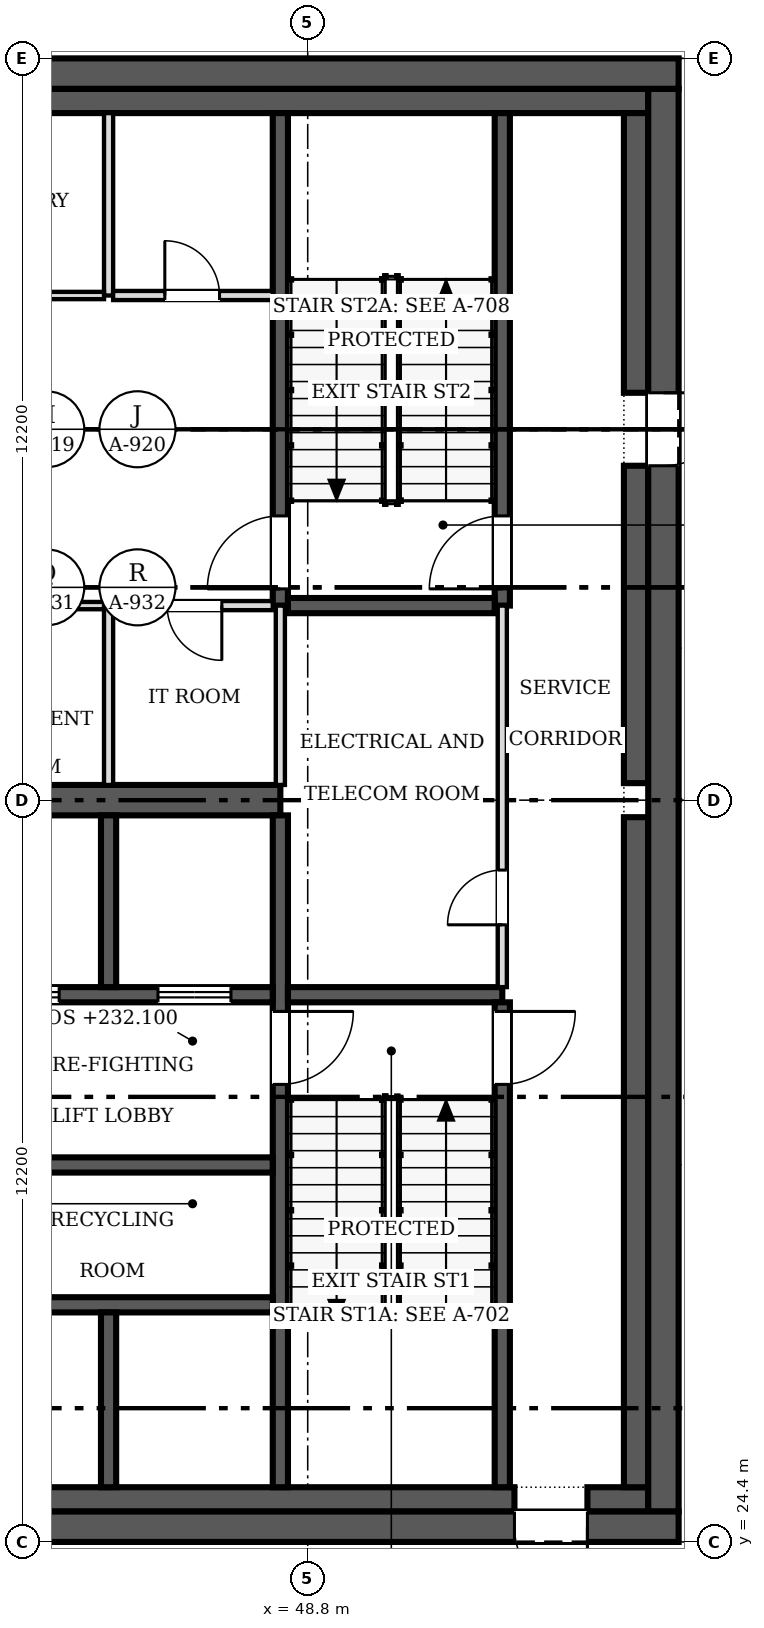
"""IFC4 building model, lengths in metres.
Left out: names, types, materials, properties, quantities, classifications, styles, units other than length and angle.
Written with IfcOpenShell. Run it as: python <this file> out.ifc"""

import sys

from ifc_helpers import new_model, si_unit, direction, frame, frame_2d, origin, place, context, subcontext, project, spatial, rectangle, extrude, source, transform, mapped, element, fill, save


model = new_model("IFC4")
c1 = context("Model", 3, precision=1e-05, world=origin(), true_north=direction((0.0, 1.0)))
c2 = subcontext(c1, "Body", "Model", "MODEL_VIEW")
j1 = project(units=[si_unit("LENGTHUNIT", "METRE"), si_unit("PLANEANGLEUNIT", "RADIAN")], contexts=[c1])
p1 = place(None, origin())
s1 = spatial("IfcSite", under=j1, at=p1, CompositionType="ELEMENT")
p2 = place(p1, origin())
s2 = spatial("IfcBuilding", under=s1, at=p2, CompositionType="ELEMENT")
p3 = place(p2, frame((0.0, 0.0, 232.1)))
s3 = spatial("IfcBuildingStorey", under=s2, at=p3, CompositionType="ELEMENT", Elevation=232.1)
p4 = place(p3, frame((54.9, 24.65, 0.0), z_axis=(0.0, 0.0, 1.0), x_axis=(-1.0, 0.0, 0.0)))
e1 = element("IfcWall", 1, at=p4, inside=s3, PredefinedType="SHEAR", context=c2, shape_type="SweptSolid", body=[
    extrude(rectangle(XDim=24.4, YDim=0.5, at=frame_2d((12.2, 0.0))), origin(), (0.0, 0.0, 1.0), 4.8),
])
m1 = source(origin(), c2, "Body", "SweptSolid", [
    extrude(rectangle(XDim=1.2, YDim=2.1, at=frame_2d((0.6, 1.05))), frame((0.0, 0.26, 0.0), z_axis=(0.0, -1.0, 0.0), x_axis=(1.0, 0.0, 0.0)), (0.0, 0.0, 1.0), 0.52),
])
p5 = place(p4, frame((1.5, 0.0, 0.0)))
e2 = element("IfcOpeningElement", 2, at=p5, cuts=e1, PredefinedType="OPENING", context=c2, shape_type="MappedRepresentation", body=[
    mapped(m1, transform((0.0, 0.0, 0.0), scale=1.0)),
])
p6 = place(p3, frame((30.5, 48.55, 0.0), z_axis=(0.0, 0.0, 1.0), x_axis=(1.0, 0.0, 0.0)))
e3 = element("IfcWall", 3, at=p6, inside=s3, PredefinedType="SHEAR", context=c2, shape_type="SweptSolid", body=[
    extrude(rectangle(XDim=24.4, YDim=0.5, at=frame_2d((12.2, 0.0))), origin(), (0.0, 0.0, 1.0), 4.8),
])
p7 = place(p3, frame((54.65, 48.3, 0.0), z_axis=(0.0, 0.0, 1.0), x_axis=(0.0, -1.0, 0.0)))
e4 = element("IfcWall", 4, at=p7, inside=s3, PredefinedType="SHEAR", context=c2, shape_type="SweptSolid", body=[
    extrude(rectangle(XDim=23.4, YDim=0.5, at=frame_2d((11.7, 0.0))), origin(), (0.0, 0.0, 1.0), 4.8),
])
p8 = place(p7, frame((5.0, 0.0, 0.0)))
e5 = element("IfcOpeningElement", 5, at=p8, cuts=e4, PredefinedType="OPENING", context=c2, shape_type="MappedRepresentation", body=[
    mapped(m1, transform((0.0, 0.0, 0.0), scale=1.0)),
])
p9 = place(p3, frame((31.0, 25.1, 0.0), z_axis=(0.0, 0.0, 1.0), x_axis=(1.0, 0.0, 0.0)))
e6 = element("IfcWall", 6, at=p9, inside=s3, PredefinedType="SOLIDWALL", context=c2, shape_type="SweptSolid", body=[
    extrude(rectangle(XDim=21.2, YDim=0.4, at=frame_2d((10.6, 0.0))), origin(), (0.0, 0.0, 1.0), 4.8),
])
p10 = place(p3, frame((53.4, 25.1, 0.0), z_axis=(0.0, 0.0, 1.0), x_axis=(1.0, 0.0, 0.0)))
e7 = element("IfcWall", 7, at=p10, inside=s3, PredefinedType="SOLIDWALL", context=c2, shape_type="SweptSolid", body=[
    extrude(rectangle(XDim=1.0, YDim=0.4, at=frame_2d((0.5, 0.0))), origin(), (0.0, 0.0, 1.0), 4.8),
])
p11 = place(p3, frame((31.0, 48.1, 0.0), z_axis=(0.0, 0.0, 1.0), x_axis=(1.0, 0.0, 0.0)))
e8 = element("IfcWall", 8, at=p11, inside=s3, PredefinedType="SOLIDWALL", context=c2, shape_type="SweptSolid", body=[
    extrude(rectangle(XDim=23.4, YDim=0.4, at=frame_2d((11.7, 0.0))), origin(), (0.0, 0.0, 1.0), 4.8),
])
p12 = place(p3, frame((54.2, 25.3, 0.0), z_axis=(0.0, 0.0, 1.0), x_axis=(0.0, 1.0, 0.0)))
e9 = element("IfcWall", 9, at=p12, inside=s3, PredefinedType="SOLIDWALL", context=c2, shape_type="SweptSolid", body=[
    extrude(rectangle(XDim=11.02, YDim=0.4, at=frame_2d((5.51, 0.0))), origin(), (0.0, 0.0, 1.0), 4.8),
])
p13 = place(p3, frame((54.2, 36.88, 0.0), z_axis=(0.0, 0.0, 1.0), x_axis=(0.0, 1.0, 0.0)))
e10 = element("IfcWall", 10, at=p13, inside=s3, PredefinedType="SOLIDWALL", context=c2, shape_type="SweptSolid", body=[
    extrude(rectangle(XDim=5.22, YDim=0.4, at=frame_2d((2.61, 0.0))), origin(), (0.0, 0.0, 1.0), 4.8),
])
p14 = place(p3, frame((54.2, 43.3, 0.0), z_axis=(0.0, 0.0, 1.0), x_axis=(0.0, 1.0, 0.0)))
e11 = element("IfcWall", 11, at=p14, inside=s3, PredefinedType="SOLIDWALL", context=c2, shape_type="SweptSolid", body=[
    extrude(rectangle(XDim=4.6, YDim=0.4, at=frame_2d((2.3, 0.0))), origin(), (0.0, 0.0, 1.0), 4.8),
])
p15 = place(p3, frame((31.4, 36.6, 0.0), z_axis=(0.0, 0.0, 1.0), x_axis=(1.0, 0.0, 0.0)))
e12 = element("IfcWall", 12, at=p15, inside=s3, PredefinedType="SHEAR", context=c2, shape_type="SweptSolid", body=[
    extrude(rectangle(XDim=16.95, YDim=0.5, at=frame_2d((8.475, 0.0))), origin(), (0.0, 0.0, 1.0), 4.8),
])
p16 = place(p3, frame((48.35, 36.35, 0.0), z_axis=(0.0, 0.0, 1.0), x_axis=(0.0, -1.0, 0.0)))
e13 = element("IfcWall", 13, at=p16, inside=s3, PredefinedType="SOLIDWALL", context=c2, shape_type="SweptSolid", body=[
    extrude(rectangle(XDim=11.05, YDim=0.25, at=frame_2d((5.525, 0.0))), origin(), (0.0, 0.0, 1.0), 4.8),
])
m2 = source(origin(), c2, "Body", "SweptSolid", [
    extrude(rectangle(XDim=1.2, YDim=2.1, at=frame_2d((0.6, 1.05))), frame((0.0, 0.135, 0.0), z_axis=(0.0, -1.0, 0.0), x_axis=(1.0, 0.0, 0.0)), (0.0, 0.0, 1.0), 0.27),
])
p17 = place(p16, frame((3.225, 0.0, 0.0)))
e14 = element("IfcOpeningElement", 14, at=p17, cuts=e13, PredefinedType="OPENING", context=c2, shape_type="MappedRepresentation", body=[
    mapped(m2, transform((0.0, 0.0, 0.0), scale=1.0)),
])
p18 = place(p3, frame((48.225, 33.4, 0.0), z_axis=(0.0, 0.0, 1.0), x_axis=(-1.0, 0.0, 0.0)))
e15 = element("IfcWall", 15, at=p18, inside=s3, PredefinedType="SOLIDWALL", context=c2, shape_type="SweptSolid", body=[
    extrude(rectangle(XDim=5.275, YDim=0.25, at=frame_2d((2.638, 0.0))), origin(), (0.0, 0.0, 1.0), 4.8),
])
p19 = place(p18, frame((3.512, 0.0, 0.0)))
e16 = element("IfcOpeningElement", 16, at=p19, cuts=e15, PredefinedType="OPENING", context=c2, shape_type="MappedRepresentation", body=[
    mapped(m2, transform((0.0, 0.0, 0.0), scale=1.0)),
])
p20 = place(p18, frame((0.688, 0.0, 0.0)))
e17 = element("IfcOpeningElement", 17, at=p20, cuts=e15, PredefinedType="OPENING", context=c2, shape_type="MappedRepresentation", body=[
    mapped(m2, transform((0.0, 0.0, 0.0), scale=1.0)),
])
p21 = place(p3, frame((48.475, 33.4, 0.0), z_axis=(0.0, 0.0, 1.0), x_axis=(1.0, 0.0, 0.0)))
e18 = element("IfcWall", 18, at=p21, inside=s3, PredefinedType="SOLIDWALL", context=c2, shape_type="SweptSolid", body=[
    extrude(rectangle(XDim=3.525, YDim=0.25, at=frame_2d((1.762, 0.0))), origin(), (0.0, 0.0, 1.0), 4.8),
])
p22 = place(p3, frame((48.35, 47.9, 0.0), z_axis=(0.0, 0.0, 1.0), x_axis=(0.0, -1.0, 0.0)))
e19 = element("IfcWall", 19, at=p22, inside=s3, PredefinedType="SOLIDWALL", context=c2, shape_type="SweptSolid", body=[
    extrude(rectangle(XDim=8.1, YDim=0.25, at=frame_2d((4.05, 0.0))), origin(), (0.0, 0.0, 1.0), 4.8),
])
p23 = place(p22, frame((6.625, 0.0, 0.0)))
e20 = element("IfcOpeningElement", 20, at=p23, cuts=e19, PredefinedType="OPENING", context=c2, shape_type="MappedRepresentation", body=[
    mapped(m2, transform((0.0, 0.0, 0.0), scale=1.0)),
])
p24 = place(p3, frame((52.0, 25.3, 0.0), z_axis=(0.0, 0.0, 1.0), x_axis=(0.0, 1.0, 0.0)))
e21 = element("IfcWall", 21, at=p24, inside=s3, PredefinedType="SOLIDWALL", context=c2, shape_type="SweptSolid", body=[
    extrude(rectangle(XDim=7.975, YDim=0.25, at=frame_2d((3.987, 0.0))), origin(), (0.0, 0.0, 1.0), 4.8),
])
p25 = place(p24, frame((6.625, 0.0, 0.0)))
e22 = element("IfcOpeningElement", 22, at=p25, cuts=e21, PredefinedType="OPENING", context=c2, shape_type="MappedRepresentation", body=[
    mapped(m2, transform((0.0, 0.0, 0.0), scale=1.0)),
])
p26 = place(p3, frame((52.0, 39.8, 0.0), z_axis=(0.0, 0.0, 1.0), x_axis=(0.0, 1.0, 0.0)))
e23 = element("IfcWall", 23, at=p26, inside=s3, PredefinedType="SOLIDWALL", context=c2, shape_type="SweptSolid", body=[
    extrude(rectangle(XDim=8.1, YDim=0.25, at=frame_2d((4.05, 0.0))), origin(), (0.0, 0.0, 1.0), 4.8),
])
p27 = place(p26, frame((0.275, 0.0, 0.0)))
e24 = element("IfcOpeningElement", 24, at=p27, cuts=e23, PredefinedType="OPENING", context=c2, shape_type="MappedRepresentation", body=[
    mapped(m2, transform((0.0, 0.0, 0.0), scale=1.0)),
])
for number, where, z_axis, x_axis in (
    (25, (42.95, 28.3, 0.0), (0.0, 0.0, 1.0), (1.0, 0.0, 0.0)),
    (26, (42.95, 30.6, 0.0), (0.0, 0.0, 1.0), (1.0, 0.0, 0.0)),
):
    element("IfcWall", number, at=place(p3, frame(where, z_axis=z_axis, x_axis=x_axis)), inside=s3, PredefinedType="SOLIDWALL", context=c2, shape_type="SweptSolid", body=[
        extrude(rectangle(XDim=5.275, YDim=0.25, at=frame_2d((2.638, 0.0))), origin(), (0.0, 0.0, 1.0), 4.8),
    ])
p28 = place(p3, frame((48.475, 39.8, 0.0), z_axis=(0.0, 0.0, 1.0), x_axis=(1.0, 0.0, 0.0)))
e27 = element("IfcWall", 27, at=p28, inside=s3, PredefinedType="SOLIDWALL", context=c2, shape_type="SweptSolid", body=[
    extrude(rectangle(XDim=3.4, YDim=0.25, at=frame_2d((1.7, 0.0))), origin(), (0.0, 0.0, 1.0), 4.8),
])
p29 = place(p3, frame((45.525, 33.525, 0.0), z_axis=(0.0, 0.0, 1.0), x_axis=(0.0, 1.0, 0.0)))
e28 = element("IfcWall", 28, at=p29, inside=s3, PredefinedType="SOLIDWALL", context=c2, shape_type="SweptSolid", body=[
    extrude(rectangle(XDim=2.825, YDim=0.25, at=frame_2d((1.413, 0.0))), origin(), (0.0, 0.0, 1.0), 4.8),
])
p30 = place(p3, frame((45.525, 25.3, 0.0), z_axis=(0.0, 0.0, 1.0), x_axis=(0.0, 1.0, 0.0)))
e29 = element("IfcWall", 29, at=p30, inside=s3, PredefinedType="SOLIDWALL", context=c2, shape_type="SweptSolid", body=[
    extrude(rectangle(XDim=2.875, YDim=0.25, at=frame_2d((1.438, 0.0))), origin(), (0.0, 0.0, 1.0), 4.8),
])
p31 = place(p3, frame((52.0, 33.525, 0.0), z_axis=(0.0, 0.0, 1.0), x_axis=(0.0, 1.0, 0.0)))
e30 = element("IfcWall", 30, at=p31, inside=s3, PredefinedType="PARTITIONING", context=c2, shape_type="SweptSolid", body=[
    extrude(rectangle(XDim=6.275, YDim=0.15, at=frame_2d((3.138, 0.0))), origin(), (0.0, 0.0, 1.0), 4.6),
])
m3 = source(origin(), c2, "Body", "SweptSolid", [
    extrude(rectangle(XDim=0.9, YDim=2.1, at=frame_2d((0.45, 1.05))), frame((0.0, 0.085, 0.0), z_axis=(0.0, -1.0, 0.0), x_axis=(1.0, 0.0, 0.0)), (0.0, 0.0, 1.0), 0.17),
])
p32 = place(p31, frame((1.025, 0.0, 0.0)))
e31 = element("IfcOpeningElement", 31, at=p32, cuts=e30, PredefinedType="OPENING", context=c2, shape_type="MappedRepresentation", body=[
    mapped(m3, transform((0.0, 0.0, 0.0), scale=1.0)),
])
for number, where, z_axis, x_axis in (
    (32, (45.525, 36.85, 0.0), (0.0, 0.0, 1.0), (0.0, 1.0, 0.0)),
    (33, (48.35, 36.85, 0.0), (0.0, 0.0, 1.0), (0.0, 1.0, 0.0)),
):
    element("IfcWall", number, at=place(p3, frame(where, z_axis=z_axis, x_axis=x_axis)), inside=s3, PredefinedType="PARTITIONING", context=c2, shape_type="SweptSolid", body=[
        extrude(rectangle(XDim=2.95, YDim=0.15, at=frame_2d((1.475, 0.0))), origin(), (0.0, 0.0, 1.0), 4.6),
    ])
p33 = place(p3, frame((45.525, 44.9, 0.0), z_axis=(0.0, 0.0, 1.0), x_axis=(0.0, 1.0, 0.0)))
e34 = element("IfcWall", 34, at=p33, inside=s3, PredefinedType="PARTITIONING", context=c2, shape_type="SweptSolid", body=[
    extrude(rectangle(XDim=3.0, YDim=0.15, at=frame_2d((1.5, 0.0))), origin(), (0.0, 0.0, 1.0), 4.6),
])
p34 = place(p3, frame((45.45, 39.8, 0.0), z_axis=(0.0, 0.0, 1.0), x_axis=(-1.0, 0.0, 0.0)))
e35 = element("IfcWall", 35, at=p34, inside=s3, PredefinedType="PARTITIONING", context=c2, shape_type="SweptSolid", body=[
    extrude(rectangle(XDim=2.5, YDim=0.12, at=frame_2d((1.25, 0.0))), origin(), (0.0, 0.0, 1.0), 4.6),
])
m4 = source(origin(), c2, "Body", "SweptSolid", [
    extrude(rectangle(XDim=0.9, YDim=2.1, at=frame_2d((0.45, 1.05))), frame((0.0, 0.07, 0.0), z_axis=(0.0, -1.0, 0.0), x_axis=(1.0, 0.0, 0.0)), (0.0, 0.0, 1.0), 0.14),
])
p35 = place(p34, frame((0.887, 0.0, 0.0)))
e36 = element("IfcOpeningElement", 36, at=p35, cuts=e35, PredefinedType="OPENING", context=c2, shape_type="MappedRepresentation", body=[
    mapped(m4, transform((0.0, 0.0, 0.0), scale=1.0)),
])
p36 = place(p3, frame((48.225, 39.8, 0.0), z_axis=(0.0, 0.0, 1.0), x_axis=(-1.0, 0.0, 0.0)))
e37 = element("IfcWall", 37, at=p36, inside=s3, PredefinedType="PARTITIONING", context=c2, shape_type="SweptSolid", body=[
    extrude(rectangle(XDim=2.625, YDim=0.15, at=frame_2d((1.312, 0.0))), origin(), (0.0, 0.0, 1.0), 4.6),
])
p37 = place(p36, frame((0.837, 0.0, 0.0)))
e38 = element("IfcOpeningElement", 38, at=p37, cuts=e37, PredefinedType="OPENING", context=c2, shape_type="MappedRepresentation", body=[
    mapped(m3, transform((0.0, 0.0, 0.0), scale=1.0)),
])
p38 = place(p3, frame((42.95, 44.9, 0.0), z_axis=(0.0, 0.0, 1.0), x_axis=(1.0, 0.0, 0.0)))
e39 = element("IfcWall", 39, at=p38, inside=s3, PredefinedType="PARTITIONING", context=c2, shape_type="SweptSolid", body=[
    extrude(rectangle(XDim=2.5, YDim=0.12, at=frame_2d((1.25, 0.0))), origin(), (0.0, 0.0, 1.0), 4.6),
])
p39 = place(p38, frame((0.712, 0.0, 0.0)))
e40 = element("IfcOpeningElement", 40, at=p39, cuts=e39, PredefinedType="OPENING", context=c2, shape_type="MappedRepresentation", body=[
    mapped(m4, transform((0.0, 0.0, 0.0), scale=1.0)),
])
p40 = place(p3, frame((45.6, 44.9, 0.0), z_axis=(0.0, 0.0, 1.0), x_axis=(1.0, 0.0, 0.0)))
e41 = element("IfcWall", 41, at=p40, inside=s3, PredefinedType="PARTITIONING", context=c2, shape_type="SweptSolid", body=[
    extrude(rectangle(XDim=2.625, YDim=0.15, at=frame_2d((1.312, 0.0))), origin(), (0.0, 0.0, 1.0), 4.6),
])
p41 = place(p40, frame((0.85, 0.0, 0.0)))
e42 = element("IfcOpeningElement", 42, at=p41, cuts=e41, PredefinedType="OPENING", context=c2, shape_type="MappedRepresentation", body=[
    mapped(m3, transform((0.0, 0.0, 0.0), scale=1.0)),
])
m5 = source(origin(), c2, "Body", "SweptSolid", [
    extrude(rectangle(XDim=1.2, YDim=2.1, at=frame_2d((0.6, 1.05))), frame((0.0, 0.025, 0.0), z_axis=(0.0, -1.0, 0.0), x_axis=(1.0, 0.0, 0.0)), (0.0, 0.0, 1.0), 0.05),
])
p42 = place(p5, origin())
e43 = element("IfcDoor", 43, at=p42, inside=s3, OperationType="SINGLE_SWING_LEFT", PredefinedType="DOOR", context=c2, shape_type="MappedRepresentation", body=[
    mapped(m5, transform((0.0, 0.0, 0.0), scale=1.0)),
])
fill(e2, e43)
p43 = place(p8, origin())
e44 = element("IfcDoor", 44, at=p43, inside=s3, OperationType="SINGLE_SWING_LEFT", PredefinedType="DOOR", context=c2, shape_type="MappedRepresentation", body=[
    mapped(m5, transform((0.0, 0.0, 0.0), scale=1.0)),
])
fill(e5, e44)
p44 = place(p17, origin())
e45 = element("IfcDoor", 45, at=p44, inside=s3, OperationType="SINGLE_SWING_LEFT", PredefinedType="DOOR", context=c2, shape_type="MappedRepresentation", body=[
    mapped(m5, transform((0.0, 0.0, 0.0), scale=1.0)),
])
fill(e14, e45)
p45 = place(p19, origin())
e46 = element("IfcDoor", 46, at=p45, inside=s3, OperationType="DOUBLE_DOOR_SLIDING", PredefinedType="DOOR", context=c2, shape_type="MappedRepresentation", body=[
    mapped(m5, transform((0.0, 0.0, 0.0), scale=1.0)),
])
fill(e16, e46)
p46 = place(p20, origin())
e47 = element("IfcDoor", 47, at=p46, inside=s3, OperationType="DOUBLE_DOOR_SLIDING", PredefinedType="DOOR", context=c2, shape_type="MappedRepresentation", body=[
    mapped(m5, transform((0.0, 0.0, 0.0), scale=1.0)),
])
fill(e17, e47)
p47 = place(p23, origin())
e48 = element("IfcDoor", 48, at=p47, inside=s3, OperationType="SINGLE_SWING_RIGHT", PredefinedType="DOOR", context=c2, shape_type="MappedRepresentation", body=[
    mapped(m5, transform((0.0, 0.0, 0.0), scale=1.0)),
])
fill(e20, e48)
p48 = place(p25, origin())
e49 = element("IfcDoor", 49, at=p48, inside=s3, OperationType="SINGLE_SWING_RIGHT", PredefinedType="DOOR", context=c2, shape_type="MappedRepresentation", body=[
    mapped(m5, transform((0.0, 0.0, 0.0), scale=1.0)),
])
fill(e22, e49)
p49 = place(p27, origin())
e50 = element("IfcDoor", 50, at=p49, inside=s3, OperationType="SINGLE_SWING_LEFT", PredefinedType="DOOR", context=c2, shape_type="MappedRepresentation", body=[
    mapped(m5, transform((0.0, 0.0, 0.0), scale=1.0)),
])
fill(e24, e50)
m6 = source(origin(), c2, "Body", "SweptSolid", [
    extrude(rectangle(XDim=0.9, YDim=2.1, at=frame_2d((0.45, 1.05))), frame((0.0, 0.025, 0.0), z_axis=(0.0, -1.0, 0.0), x_axis=(1.0, 0.0, 0.0)), (0.0, 0.0, 1.0), 0.05),
])
p50 = place(p32, origin())
e51 = element("IfcDoor", 51, at=p50, inside=s3, OperationType="SINGLE_SWING_LEFT", PredefinedType="DOOR", context=c2, shape_type="MappedRepresentation", body=[
    mapped(m6, transform((0.0, 0.0, 0.0), scale=1.0)),
])
fill(e31, e51)
p51 = place(p37, origin())
e52 = element("IfcDoor", 52, at=p51, inside=s3, OperationType="SINGLE_SWING_LEFT", PredefinedType="DOOR", context=c2, shape_type="MappedRepresentation", body=[
    mapped(m6, transform((0.0, 0.0, 0.0), scale=1.0)),
])
fill(e38, e52)
p52 = place(p41, origin())
e53 = element("IfcDoor", 53, at=p52, inside=s3, OperationType="SINGLE_SWING_LEFT", PredefinedType="DOOR", context=c2, shape_type="MappedRepresentation", body=[
    mapped(m6, transform((0.0, 0.0, 0.0), scale=1.0)),
])
fill(e42, e53)
save(model, sys.argv[1])
